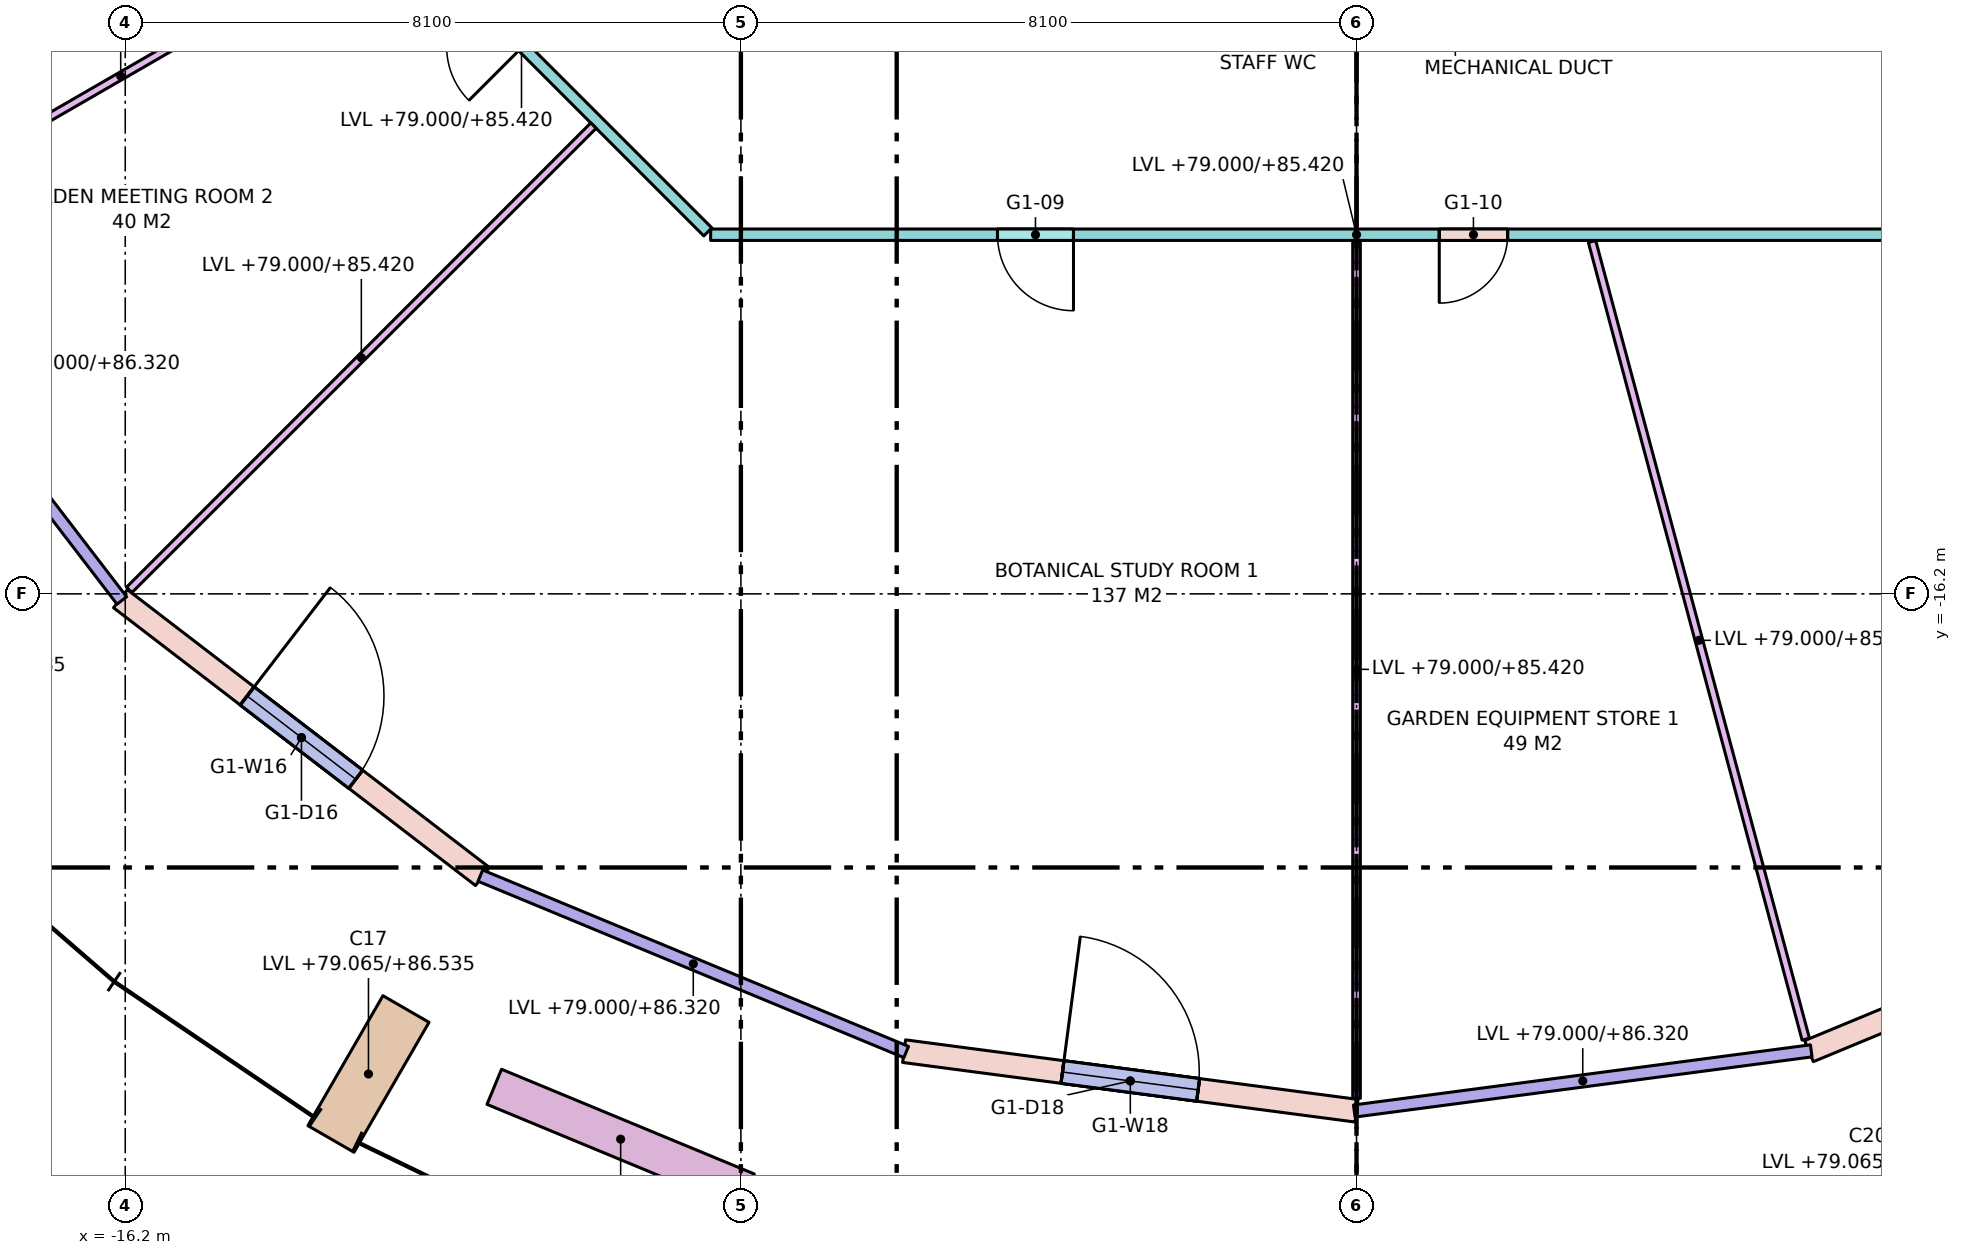
"""IFC4 building model, lengths in metres.
Left out: names, types, materials, properties, quantities, classifications, styles, units other than length and angle.
Written with IfcOpenShell. Run it as: python <this file> out.ifc"""

import sys

from ifc_helpers import new_model, si_unit, direction, frame, frame_2d, origin, origin_2d, place, context, subcontext, project, spatial, rectangle, extrude, element, fill, save


model = new_model("IFC4")
c1 = context("Model", 3, precision=1e-05, world=origin(), true_north=direction((0.0, 1.0)))
c2 = subcontext(c1, "Body", "Model", "MODEL_VIEW")
j1 = project(units=[si_unit("LENGTHUNIT", "METRE"), si_unit("PLANEANGLEUNIT", "RADIAN")], contexts=[c1])
p1 = place(None, origin())
s1 = spatial("IfcSite", under=j1, at=p1, CompositionType="ELEMENT")
p2 = place(p1, origin())
s2 = spatial("IfcBuilding", under=s1, at=p2, CompositionType="ELEMENT")
p3 = place(p2, frame((0.0, 0.0, 79.0)))
s3 = spatial("IfcBuildingStorey", under=s2, at=p3, CompositionType="ELEMENT", Elevation=79.0)
p4 = place(p3, frame((-13.246, -22.942, 0.065), z_axis=(0.065200584695, 0.112966818214, 0.991457201163), x_axis=(-0.866094574686, 0.499880173341, 0.0)))
e1 = element("IfcColumn", 1, at=p4, inside=s3, PredefinedType="COLUMN", context=c2, shape_type="SweptSolid", body=[
    extrude(rectangle(XDim=0.7, YDim=1.0, at=origin_2d()), origin(), (0.0, 0.0, 1.0), 7.534),
])
p5 = place(p3, frame((-16.263, -16.263, 0.0), z_axis=(0.0, 0.0, 1.0), x_axis=(0.793339924758, -0.608778912074, 0.0)))
e2 = element("IfcWall", 2, at=p5, inside=s3, PredefinedType="STANDARD", context=c2, shape_type="SweptSolid", body=[
    extrude(rectangle(XDim=6.004, YDim=0.3, at=frame_2d((3.002, 0.0))), origin(), (0.0, 0.0, 1.0), 7.32),
])
p6 = place(p5, frame((2.102, 0.0, 0.0)))
e3 = element("IfcOpeningElement", 3, at=p6, cuts=e2, PredefinedType="OPENING", context=c2, shape_type="SweptSolid", body=[
    extrude(rectangle(XDim=1.8, YDim=2.4, at=frame_2d((0.9, 1.2))), frame((0.0, 0.16, 0.0), z_axis=(0.0, -1.0, 0.0), x_axis=(1.0, 0.0, 0.0)), (0.0, 0.0, 1.0), 0.32),
])
p7 = place(p5, frame((2.102, 0.0, 2.8)))
e4 = element("IfcOpeningElement", 4, at=p7, cuts=e2, PredefinedType="OPENING", context=c2, shape_type="SweptSolid", body=[
    extrude(rectangle(XDim=1.8, YDim=4.3, at=frame_2d((0.9, 2.15))), frame((0.0, 0.16, 0.0), z_axis=(0.0, -1.0, 0.0), x_axis=(1.0, 0.0, 0.0)), (0.0, 0.0, 1.0), 0.32),
])
p8 = place(p3, frame((-5.953, -22.216, 0.0), z_axis=(0.0, 0.0, 1.0), x_axis=(0.991445297315, -0.130522880875, 0.0)))
e5 = element("IfcWall", 5, at=p8, inside=s3, PredefinedType="STANDARD", context=c2, shape_type="SweptSolid", body=[
    extrude(rectangle(XDim=6.004, YDim=0.3, at=frame_2d((3.002, 0.0))), origin(), (0.0, 0.0, 1.0), 7.32),
])
p9 = place(p8, frame((2.102, 0.0, 0.0)))
e6 = element("IfcOpeningElement", 6, at=p9, cuts=e5, PredefinedType="OPENING", context=c2, shape_type="SweptSolid", body=[
    extrude(rectangle(XDim=1.8, YDim=2.4, at=frame_2d((0.9, 1.2))), frame((0.0, 0.16, 0.0), z_axis=(0.0, -1.0, 0.0), x_axis=(1.0, 0.0, 0.0)), (0.0, 0.0, 1.0), 0.32),
])
p10 = place(p8, frame((2.102, 0.0, 2.8)))
e7 = element("IfcOpeningElement", 7, at=p10, cuts=e5, PredefinedType="OPENING", context=c2, shape_type="SweptSolid", body=[
    extrude(rectangle(XDim=1.8, YDim=4.3, at=frame_2d((0.9, 2.15))), frame((0.0, 0.16, 0.0), z_axis=(0.0, -1.0, 0.0), x_axis=(1.0, 0.0, 0.0)), (0.0, 0.0, 1.0), 0.32),
])
p11 = place(p3, frame((5.953, -22.216, 0.0), z_axis=(0.0, 0.0, 1.0), x_axis=(0.923884511653, 0.382671411433, 0.0)))
e8 = element("IfcWall", 8, at=p11, inside=s3, PredefinedType="STANDARD", context=c2, shape_type="SweptSolid", body=[
    extrude(rectangle(XDim=6.004, YDim=0.3, at=frame_2d((3.002, 0.0))), origin(), (0.0, 0.0, 1.0), 7.32),
])
p12 = place(p11, frame((2.102, 0.0, 0.0)))
e9 = element("IfcOpeningElement", 9, at=p12, cuts=e8, PredefinedType="OPENING", context=c2, shape_type="SweptSolid", body=[
    extrude(rectangle(XDim=1.8, YDim=2.4, at=frame_2d((0.9, 1.2))), frame((0.0, 0.16, 0.0), z_axis=(0.0, -1.0, 0.0), x_axis=(1.0, 0.0, 0.0)), (0.0, 0.0, 1.0), 0.32),
])
p13 = place(p11, frame((2.102, 0.0, 2.8)))
e10 = element("IfcOpeningElement", 10, at=p13, cuts=e8, PredefinedType="OPENING", context=c2, shape_type="SweptSolid", body=[
    extrude(rectangle(XDim=1.8, YDim=4.3, at=frame_2d((0.9, 2.15))), frame((0.0, 0.16, 0.0), z_axis=(0.0, -1.0, 0.0), x_axis=(1.0, 0.0, 0.0)), (0.0, 0.0, 1.0), 0.32),
])
p14 = place(p3, frame((-11.345, -22.685, 0.0), z_axis=(0.0, 0.0, 1.0), x_axis=(0.923885420167, -0.382669217998, 0.0)))
e11 = element("IfcWall", 11, at=p14, inside=s3, PredefinedType="PARAPET", context=c2, shape_type="SweptSolid", body=[
    extrude(rectangle(XDim=3.6, YDim=0.5, at=frame_2d((1.8, 0.0))), origin(), (0.0, 0.0, 1.0), 0.9),
])
p15 = place(p3, frame((8.498, -11.475, 0.0), z_axis=(0.0, 0.0, 1.0), x_axis=(-1.0, 0.0, 0.0)))
e12 = element("IfcWall", 12, at=p15, inside=s3, PredefinedType="PARTITIONING", context=c2, shape_type="SweptSolid", body=[
    extrude(rectangle(XDim=16.996, YDim=0.15, at=frame_2d((8.498, 0.0))), origin(), (0.0, 0.0, 1.0), 6.42),
])
p16 = place(p15, frame((12.222, 0.0, 0.0)))
e13 = element("IfcOpeningElement", 13, at=p16, cuts=e12, PredefinedType="OPENING", context=c2, shape_type="SweptSolid", body=[
    extrude(rectangle(XDim=1.0, YDim=2.1, at=frame_2d((0.5, 1.05))), frame((0.0, 0.085, 0.0), z_axis=(0.0, -1.0, 0.0), x_axis=(1.0, 0.0, 0.0)), (0.0, 0.0, 1.0), 0.17),
])
p17 = place(p15, frame((6.51, 0.0, 0.0)))
e14 = element("IfcOpeningElement", 14, at=p17, cuts=e12, PredefinedType="OPENING", context=c2, shape_type="SweptSolid", body=[
    extrude(rectangle(XDim=0.9, YDim=2.1, at=frame_2d((0.45, 1.05))), frame((0.0, 0.085, 0.0), z_axis=(0.0, -1.0, 0.0), x_axis=(1.0, 0.0, 0.0)), (0.0, 0.0, 1.0), 0.17),
])
p18 = place(p3, frame((-8.535, -11.438, 0.0), z_axis=(0.0, 0.0, 1.0), x_axis=(-0.707106781187, 0.707106781187, 0.0)))
e15 = element("IfcWall", 15, at=p18, inside=s3, PredefinedType="PARTITIONING", context=c2, shape_type="SweptSolid", body=[
    extrude(rectangle(XDim=6.934, YDim=0.15, at=frame_2d((3.467, 0.0))), origin(), (0.0, 0.0, 1.0), 6.42),
])
p19 = place(p18, frame((3.446, 0.0, 0.0)))
e16 = element("IfcOpeningElement", 16, at=p19, cuts=e15, PredefinedType="OPENING", context=c2, shape_type="SweptSolid", body=[
    extrude(rectangle(XDim=1.0, YDim=2.1, at=frame_2d((0.5, 1.05))), frame((0.0, 0.085, 0.0), z_axis=(0.0, -1.0, 0.0), x_axis=(1.0, 0.0, 0.0)), (0.0, 0.0, 1.0), 0.17),
])
p20 = place(p3, frame((-12.742, -7.357, 0.0), z_axis=(0.0, 0.0, 1.0), x_axis=(-0.866022418986, -0.500005169787, 0.0)))
e17 = element("IfcWall", 17, at=p20, inside=s3, PredefinedType="PARTITIONING", context=c2, shape_type="SweptSolid", body=[
    extrude(rectangle(XDim=8.123, YDim=0.1, at=frame_2d((4.062, 0.0))), origin(), (0.0, 0.0, 1.0), 6.42),
])
p21 = place(p3, frame((-10.04, -10.04, 0.0), z_axis=(0.0, 0.0, 1.0), x_axis=(-0.707106781187, -0.707106781187, 0.0)))
e18 = element("IfcWall", 18, at=p21, inside=s3, PredefinedType="PARTITIONING", context=c2, shape_type="SweptSolid", body=[
    extrude(rectangle(XDim=8.639, YDim=0.1, at=frame_2d((4.319, 0.0))), origin(), (0.0, 0.0, 1.0), 6.42),
])
p22 = place(p3, frame((0.0, -11.55, 0.0), z_axis=(0.0, 0.0, 1.0), x_axis=(0.0, -1.0, 0.0)))
e19 = element("IfcWall", 19, at=p22, inside=s3, PredefinedType="PARTITIONING", context=c2, shape_type="SweptSolid", body=[
    extrude(rectangle(XDim=11.287, YDim=0.1, at=frame_2d((5.643, 0.0))), origin(), (0.0, 0.0, 1.0), 6.42),
])
p23 = place(p3, frame((3.099, -11.564, 0.0), z_axis=(0.0, 0.0, 1.0), x_axis=(0.258823321379, -0.965924680454, 0.0)))
e20 = element("IfcWall", 20, at=p23, inside=s3, PredefinedType="PARTITIONING", context=c2, shape_type="SweptSolid", body=[
    extrude(rectangle(XDim=10.865, YDim=0.1, at=frame_2d((5.432, 0.0))), origin(), (0.0, 0.0, 1.0), 6.42),
])
p24 = place(p6, origin())
e21 = element("IfcDoor", 21, at=p24, inside=s3, OperationType="SINGLE_SWING_LEFT", PredefinedType="DOOR", context=c2, shape_type="SweptSolid", body=[
    extrude(rectangle(XDim=1.8, YDim=2.4, at=frame_2d((0.9, 1.2))), frame((0.0, 0.025, 0.0), z_axis=(0.0, -1.0, 0.0), x_axis=(1.0, 0.0, 0.0)), (0.0, 0.0, 1.0), 0.05),
])
fill(e3, e21)
p25 = place(p7, origin())
e22 = element("IfcWindow", 22, at=p25, inside=s3, PartitioningType="SINGLE_PANEL", PredefinedType="WINDOW", context=c2, shape_type="SweptSolid", body=[
    extrude(rectangle(XDim=1.8, YDim=4.3, at=frame_2d((0.9, 2.15))), frame((0.0, 0.03, 0.0), z_axis=(0.0, -1.0, 0.0), x_axis=(1.0, 0.0, 0.0)), (0.0, 0.0, 1.0), 0.06),
])
fill(e4, e22)
p26 = place(p9, origin())
e23 = element("IfcDoor", 23, at=p26, inside=s3, OperationType="SINGLE_SWING_LEFT", PredefinedType="DOOR", context=c2, shape_type="SweptSolid", body=[
    extrude(rectangle(XDim=1.8, YDim=2.4, at=frame_2d((0.9, 1.2))), frame((0.0, 0.025, 0.0), z_axis=(0.0, -1.0, 0.0), x_axis=(1.0, 0.0, 0.0)), (0.0, 0.0, 1.0), 0.05),
])
fill(e6, e23)
p27 = place(p10, origin())
e24 = element("IfcWindow", 24, at=p27, inside=s3, PartitioningType="SINGLE_PANEL", PredefinedType="WINDOW", context=c2, shape_type="SweptSolid", body=[
    extrude(rectangle(XDim=1.8, YDim=4.3, at=frame_2d((0.9, 2.15))), frame((0.0, 0.03, 0.0), z_axis=(0.0, -1.0, 0.0), x_axis=(1.0, 0.0, 0.0)), (0.0, 0.0, 1.0), 0.06),
])
fill(e7, e24)
p28 = place(p16, origin())
e25 = element("IfcDoor", 25, at=p28, inside=s3, OperationType="SINGLE_SWING_LEFT", PredefinedType="DOOR", context=c2, shape_type="SweptSolid", body=[
    extrude(rectangle(XDim=1.0, YDim=2.1, at=frame_2d((0.5, 1.05))), frame((0.0, 0.025, 0.0), z_axis=(0.0, -1.0, 0.0), x_axis=(1.0, 0.0, 0.0)), (0.0, 0.0, 1.0), 0.05),
])
fill(e13, e25)
p29 = place(p17, origin())
e26 = element("IfcDoor", 26, at=p29, inside=s3, OperationType="SINGLE_SWING_RIGHT", PredefinedType="DOOR", context=c2, shape_type="SweptSolid", body=[
    extrude(rectangle(XDim=0.9, YDim=2.1, at=frame_2d((0.45, 1.05))), frame((0.0, 0.025, 0.0), z_axis=(0.0, -1.0, 0.0), x_axis=(1.0, 0.0, 0.0)), (0.0, 0.0, 1.0), 0.05),
])
fill(e14, e26)
save(model, sys.argv[1])
